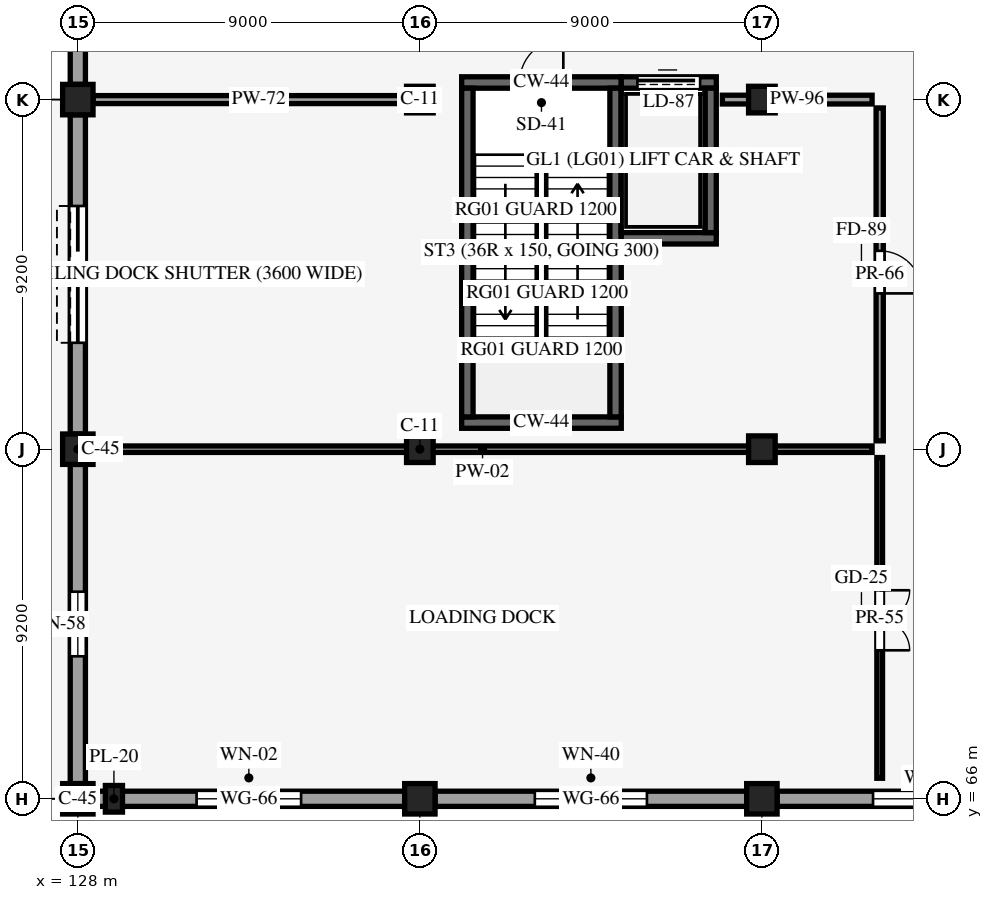
"""IFC4 building model, lengths in metres.
Left out: names, types, materials, properties, quantities, classifications, styles, units other than length and angle.
Written with IfcOpenShell. Run it as: python <this file> out.ifc"""

import sys

from ifc_helpers import new_model, si_unit, direction, frame, frame_2d, origin, origin_2d, place, context, subcontext, project, spatial, rectangle, extrude, element, fill, save


model = new_model("IFC4")
c1 = context("Model", 3, precision=1e-05, world=origin(), true_north=direction((0.0, 1.0)))
c2 = subcontext(c1, "Body", "Model", "MODEL_VIEW")
j1 = project(units=[si_unit("LENGTHUNIT", "METRE"), si_unit("PLANEANGLEUNIT", "RADIAN")], contexts=[c1])
p1 = place(None, origin())
s1 = spatial("IfcSite", under=j1, at=p1, CompositionType="ELEMENT")
p2 = place(p1, origin())
s2 = spatial("IfcBuilding", under=s1, at=p2, CompositionType="ELEMENT")
p3 = place(p2, origin())
s3 = spatial("IfcBuildingStorey", under=s2, at=p3, CompositionType="ELEMENT", Elevation=0.0)
for number, where, z_axis, x_axis in (
    (1, (128.0, 66.0, 0.0), (0.0, 0.0, 1.0), (1.0, 0.0, 0.0)),
    (2, (128.0, 75.2, 0.0), (0.0, 0.0, 1.0), (1.0, 0.0, 0.0)),
    (3, (128.0, 84.4, 0.0), (0.0, 0.0, 1.0), (1.0, 0.0, 0.0)),
    (4, (137.0, 66.0, 0.0), (0.0, 0.0, 1.0), (1.0, 0.0, 0.0)),
):
    element("IfcColumn", number, at=place(p3, frame(where, z_axis=z_axis, x_axis=x_axis)), inside=s3, PredefinedType="COLUMN", context=c2, shape_type="SweptSolid", body=[
        extrude(rectangle(XDim=0.8, YDim=0.8, at=origin_2d()), origin(), (0.0, 0.0, 1.0), 5.4),
    ])
for number, where, z_axis, x_axis in (
    (5, (137.0, 75.2, 0.0), (0.0, 0.0, 1.0), (1.0, 0.0, 0.0)),
    (6, (137.0, 84.4, 0.0), (0.0, 0.0, 1.0), (1.0, 0.0, 0.0)),
):
    element("IfcColumn", number, at=place(p3, frame(where, z_axis=z_axis, x_axis=x_axis)), inside=s3, PredefinedType="COLUMN", context=c2, shape_type="SweptSolid", body=[
        extrude(rectangle(XDim=0.7, YDim=0.7, at=origin_2d()), origin(), (0.0, 0.0, 1.0), 5.4),
    ])
p4 = place(p3, frame((146.0, 66.0, 0.0), z_axis=(0.0, 0.0, 1.0), x_axis=(1.0, 0.0, 0.0)))
e7 = element("IfcColumn", 7, at=p4, inside=s3, PredefinedType="COLUMN", context=c2, shape_type="SweptSolid", body=[
    extrude(rectangle(XDim=0.8, YDim=0.8, at=origin_2d()), origin(), (0.0, 0.0, 1.0), 5.4),
])
for number, where, z_axis, x_axis in (
    (8, (146.0, 75.2, 0.0), (0.0, 0.0, 1.0), (1.0, 0.0, 0.0)),
    (9, (146.0, 84.4, 0.0), (0.0, 0.0, 1.0), (1.0, 0.0, 0.0)),
):
    element("IfcColumn", number, at=place(p3, frame(where, z_axis=z_axis, x_axis=x_axis)), inside=s3, PredefinedType="COLUMN", context=c2, shape_type="SweptSolid", body=[
        extrude(rectangle(XDim=0.7, YDim=0.7, at=origin_2d()), origin(), (0.0, 0.0, 1.0), 5.4),
    ])
p5 = place(p3, frame((128.95, 66.0, 0.0), z_axis=(0.0, 0.0, 1.0), x_axis=(1.0, 0.0, 0.0)))
e10 = element("IfcColumn", 10, at=p5, inside=s3, PredefinedType="PILASTER", context=c2, shape_type="SweptSolid", body=[
    extrude(rectangle(XDim=0.45, YDim=0.7, at=origin_2d()), origin(), (0.0, 0.0, 1.0), 4.35),
])
p6 = place(p3, frame((128.4, 66.0, 0.0), z_axis=(0.0, 0.0, 1.0), x_axis=(1.0, 0.0, 0.0)))
e11 = element("IfcWall", 11, at=p6, inside=s3, PredefinedType="STANDARD", context=c2, shape_type="SweptSolid", body=[
    extrude(rectangle(XDim=8.2, YDim=0.4, at=frame_2d((4.1, 0.0))), origin(), (0.0, 0.0, 1.0), 4.095),
])
p7 = place(p6, frame((5.475, 0.0, 0.85), z_axis=(0.0, 0.0, 1.0), x_axis=(-1.0, 0.0, 0.0)))
e12 = element("IfcOpeningElement", 12, at=p7, cuts=e11, PredefinedType="OPENING", context=c2, shape_type="SweptSolid", body=[
    extrude(rectangle(XDim=2.75, YDim=2.45, at=frame_2d((1.375, 1.225))), frame((0.0, 0.21, 0.0), z_axis=(0.0, -1.0, 0.0), x_axis=(1.0, 0.0, 0.0)), (0.0, 0.0, 1.0), 0.42),
])
p8 = place(p3, frame((137.4, 66.0, 0.0), z_axis=(0.0, 0.0, 1.0), x_axis=(1.0, 0.0, 0.0)))
e13 = element("IfcWall", 13, at=p8, inside=s3, PredefinedType="STANDARD", context=c2, shape_type="SweptSolid", body=[
    extrude(rectangle(XDim=8.2, YDim=0.4, at=frame_2d((4.1, 0.0))), origin(), (0.0, 0.0, 1.0), 4.095),
])
p9 = place(p8, frame((5.575, 0.0, 0.85), z_axis=(0.0, 0.0, 1.0), x_axis=(-1.0, 0.0, 0.0)))
e14 = element("IfcOpeningElement", 14, at=p9, cuts=e13, PredefinedType="OPENING", context=c2, shape_type="SweptSolid", body=[
    extrude(rectangle(XDim=2.95, YDim=2.5, at=frame_2d((1.475, 1.25))), frame((0.0, 0.21, 0.0), z_axis=(0.0, -1.0, 0.0), x_axis=(1.0, 0.0, 0.0)), (0.0, 0.0, 1.0), 0.42),
])
p10 = place(p3, frame((146.4, 66.0, 0.0), z_axis=(0.0, 0.0, 1.0), x_axis=(1.0, 0.0, 0.0)))
e15 = element("IfcWall", 15, at=p10, inside=s3, PredefinedType="STANDARD", context=c2, shape_type="SweptSolid", body=[
    extrude(rectangle(XDim=8.2, YDim=0.4, at=frame_2d((4.1, 0.0))), origin(), (0.0, 0.0, 1.0), 4.095),
])
p11 = place(p10, frame((5.675, 0.0, 0.85), z_axis=(0.0, 0.0, 1.0), x_axis=(-1.0, 0.0, 0.0)))
e16 = element("IfcOpeningElement", 16, at=p11, cuts=e15, PredefinedType="OPENING", context=c2, shape_type="SweptSolid", body=[
    extrude(rectangle(XDim=3.15, YDim=2.55, at=frame_2d((1.575, 1.275))), frame((0.0, 0.21, 0.0), z_axis=(0.0, -1.0, 0.0), x_axis=(1.0, 0.0, 0.0)), (0.0, 0.0, 1.0), 0.42),
])
p12 = place(p3, frame((128.0, 66.4, 0.0), z_axis=(0.0, 0.0, 1.0), x_axis=(0.0, 1.0, 0.0)))
e17 = element("IfcWall", 17, at=p12, inside=s3, PredefinedType="STANDARD", context=c2, shape_type="SweptSolid", body=[
    extrude(rectangle(XDim=8.4, YDim=0.4, at=frame_2d((4.2, 0.0))), origin(), (0.0, 0.0, 1.0), 4.095),
])
p13 = place(p12, frame((3.35, 0.0, 0.85)))
e18 = element("IfcOpeningElement", 18, at=p13, cuts=e17, PredefinedType="OPENING", context=c2, shape_type="SweptSolid", body=[
    extrude(rectangle(XDim=1.7, YDim=2.3, at=frame_2d((0.85, 1.15))), frame((0.0, 0.21, 0.0), z_axis=(0.0, -1.0, 0.0), x_axis=(1.0, 0.0, 0.0)), (0.0, 0.0, 1.0), 0.42),
])
p14 = place(p3, frame((128.0, 75.6, 0.0), z_axis=(0.0, 0.0, 1.0), x_axis=(0.0, 1.0, 0.0)))
e19 = element("IfcWall", 19, at=p14, inside=s3, PredefinedType="STANDARD", context=c2, shape_type="SweptSolid", body=[
    extrude(rectangle(XDim=8.4, YDim=0.4, at=frame_2d((4.2, 0.0))), origin(), (0.0, 0.0, 1.0), 4.095),
])
p15 = place(p14, frame((2.4, 0.0, 0.0)))
e20 = element("IfcOpeningElement", 20, at=p15, cuts=e19, PredefinedType="OPENING", context=c2, shape_type="SweptSolid", body=[
    extrude(rectangle(XDim=3.6, YDim=3.91, at=frame_2d((1.8, 1.955))), frame((0.0, 0.21, 0.0), z_axis=(0.0, -1.0, 0.0), x_axis=(1.0, 0.0, 0.0)), (0.0, 0.0, 1.0), 0.42),
])
p16 = place(p3, frame((128.0, 84.8, 0.0), z_axis=(0.0, 0.0, 1.0), x_axis=(0.0, 1.0, 0.0)))
e21 = element("IfcWall", 21, at=p16, inside=s3, PredefinedType="STANDARD", context=c2, shape_type="SweptSolid", body=[
    extrude(rectangle(XDim=8.4, YDim=0.4, at=frame_2d((4.2, 0.0))), origin(), (0.0, 0.0, 1.0), 4.095),
])
p17 = place(p16, frame((3.05, 0.0, 0.85)))
e22 = element("IfcOpeningElement", 22, at=p17, cuts=e21, PredefinedType="OPENING", context=c2, shape_type="SweptSolid", body=[
    extrude(rectangle(XDim=2.3, YDim=2.5, at=frame_2d((1.15, 1.25))), frame((0.0, 0.21, 0.0), z_axis=(0.0, -1.0, 0.0), x_axis=(1.0, 0.0, 0.0)), (0.0, 0.0, 1.0), 0.42),
])
p18 = place(p3, frame((138.1, 84.85, 0.0), z_axis=(0.0, 0.0, 1.0), x_axis=(1.0, 0.0, 0.0)))
e23 = element("IfcWall", 23, at=p18, inside=s3, PredefinedType="SHEAR", context=c2, shape_type="SweptSolid", body=[
    extrude(rectangle(XDim=4.2, YDim=0.3, at=frame_2d((2.1, 0.0))), origin(), (0.0, 0.0, 1.0), 5.12),
])
p19 = place(p18, frame((1.525, 0.0, 0.0)))
e24 = element("IfcOpeningElement", 24, at=p19, cuts=e23, PredefinedType="OPENING", context=c2, shape_type="SweptSolid", body=[
    extrude(rectangle(XDim=1.15, YDim=2.2, at=frame_2d((0.575, 1.1))), frame((0.0, 0.16, 0.0), z_axis=(0.0, -1.0, 0.0), x_axis=(1.0, 0.0, 0.0)), (0.0, 0.0, 1.0), 0.32),
])
p20 = place(p3, frame((138.1, 75.9, 0.0), z_axis=(0.0, 0.0, 1.0), x_axis=(1.0, 0.0, 0.0)))
e25 = element("IfcWall", 25, at=p20, inside=s3, PredefinedType="SHEAR", context=c2, shape_type="SweptSolid", body=[
    extrude(rectangle(XDim=4.2, YDim=0.3, at=frame_2d((2.1, 0.0))), origin(), (0.0, 0.0, 1.0), 5.12),
])
for number, where, z_axis, x_axis in (
    (26, (138.25, 76.05, 0.0), (0.0, 0.0, 1.0), (0.0, 1.0, 0.0)),
    (27, (142.15, 76.05, 0.0), (0.0, 0.0, 1.0), (0.0, 1.0, 0.0)),
):
    element("IfcWall", number, at=place(p3, frame(where, z_axis=z_axis, x_axis=x_axis)), inside=s3, PredefinedType="SHEAR", context=c2, shape_type="SweptSolid", body=[
        extrude(rectangle(XDim=8.65, YDim=0.3, at=frame_2d((4.325, 0.0))), origin(), (0.0, 0.0, 1.0), 5.12),
    ])
p21 = place(p3, frame((142.3, 84.85, 0.0), z_axis=(0.0, 0.0, 1.0), x_axis=(1.0, 0.0, 0.0)))
e28 = element("IfcWall", 28, at=p21, inside=s3, PredefinedType="SHEAR", context=c2, shape_type="SweptSolid", body=[
    extrude(rectangle(XDim=2.5, YDim=0.3, at=frame_2d((1.25, 0.0))), origin(), (0.0, 0.0, 1.0), 5.12),
])
p22 = place(p21, frame((0.425, 0.0, 0.0)))
e29 = element("IfcOpeningElement", 29, at=p22, cuts=e28, PredefinedType="OPENING", context=c2, shape_type="SweptSolid", body=[
    extrude(rectangle(XDim=1.65, YDim=2.45, at=frame_2d((0.825, 1.225))), frame((0.0, 0.16, 0.0), z_axis=(0.0, -1.0, 0.0), x_axis=(1.0, 0.0, 0.0)), (0.0, 0.0, 1.0), 0.32),
])
p23 = place(p3, frame((142.3, 80.75, 0.0), z_axis=(0.0, 0.0, 1.0), x_axis=(1.0, 0.0, 0.0)))
e30 = element("IfcWall", 30, at=p23, inside=s3, PredefinedType="SHEAR", context=c2, shape_type="SweptSolid", body=[
    extrude(rectangle(XDim=2.5, YDim=0.3, at=frame_2d((1.25, 0.0))), origin(), (0.0, 0.0, 1.0), 5.12),
])
p24 = place(p3, frame((144.65, 80.9, 0.0), z_axis=(0.0, 0.0, 1.0), x_axis=(0.0, 1.0, 0.0)))
e31 = element("IfcWall", 31, at=p24, inside=s3, PredefinedType="SHEAR", context=c2, shape_type="SweptSolid", body=[
    extrude(rectangle(XDim=3.8, YDim=0.3, at=frame_2d((1.9, 0.0))), origin(), (0.0, 0.0, 1.0), 5.12),
])
p25 = place(p3, frame((149.1, 66.54, 0.0), z_axis=(0.0, 0.0, 1.0), x_axis=(0.0, 1.0, 0.0)))
e32 = element("IfcWall", 32, at=p25, inside=s3, PredefinedType="PARTITIONING", context=c2, shape_type="SweptSolid", body=[
    extrude(rectangle(XDim=8.44, YDim=0.15, at=frame_2d((4.22, 0.0))), origin(), (0.0, 0.0, 1.0), 4.095),
])
p26 = place(p25, frame((4.948, 0.0, 0.0), z_axis=(0.0, 0.0, 1.0), x_axis=(-1.0, 0.0, 0.0)))
e33 = element("IfcOpeningElement", 33, at=p26, cuts=e32, PredefinedType="OPENING", context=c2, shape_type="SweptSolid", body=[
    extrude(rectangle(XDim=1.58, YDim=2.38, at=frame_2d((0.79, 1.19))), frame((0.0, 0.085, 0.0), z_axis=(0.0, -1.0, 0.0), x_axis=(1.0, 0.0, 0.0)), (0.0, 0.0, 1.0), 0.17),
])
p27 = place(p3, frame((128.4, 75.2, 0.0), z_axis=(0.0, 0.0, 1.0), x_axis=(1.0, 0.0, 0.0)))
e34 = element("IfcWall", 34, at=p27, inside=s3, PredefinedType="PARTITIONING", context=c2, shape_type="SweptSolid", body=[
    extrude(rectangle(XDim=20.5, YDim=0.17, at=frame_2d((10.25, 0.0))), origin(), (0.0, 0.0, 1.0), 4.095),
])
p28 = place(p3, frame((149.1, 75.42, 0.0), z_axis=(0.0, 0.0, 1.0), x_axis=(0.0, 1.0, 0.0)))
e35 = element("IfcWall", 35, at=p28, inside=s3, PredefinedType="PARTITIONING", context=c2, shape_type="SweptSolid", body=[
    extrude(rectangle(XDim=8.76, YDim=0.19, at=frame_2d((4.38, 0.0))), origin(), (0.0, 0.0, 1.0), 4.095),
])
p29 = place(p28, frame((5.0, 0.0, 0.0), z_axis=(0.0, 0.0, 1.0), x_axis=(-1.0, 0.0, 0.0)))
e36 = element("IfcOpeningElement", 36, at=p29, cuts=e35, PredefinedType="OPENING", context=c2, shape_type="SweptSolid", body=[
    extrude(rectangle(XDim=1.12, YDim=2.26, at=frame_2d((0.56, 1.13))), frame((0.0, 0.105, 0.0), z_axis=(0.0, -1.0, 0.0), x_axis=(1.0, 0.0, 0.0)), (0.0, 0.0, 1.0), 0.21),
])
p30 = place(p3, frame((128.4, 84.4, 0.0), z_axis=(0.0, 0.0, 1.0), x_axis=(1.0, 0.0, 0.0)))
e37 = element("IfcWall", 37, at=p30, inside=s3, PredefinedType="PARTITIONING", context=c2, shape_type="SweptSolid", body=[
    extrude(rectangle(XDim=8.72, YDim=0.21, at=frame_2d((4.36, 0.0))), origin(), (0.0, 0.0, 1.0), 4.095),
])
p31 = place(p3, frame((144.96, 84.4, 0.0), z_axis=(0.0, 0.0, 1.0), x_axis=(1.0, 0.0, 0.0)))
e38 = element("IfcWall", 38, at=p31, inside=s3, PredefinedType="PARTITIONING", context=c2, shape_type="SweptSolid", body=[
    extrude(rectangle(XDim=3.94, YDim=0.23, at=frame_2d((1.97, 0.0))), origin(), (0.0, 0.0, 1.0), 4.095),
])
p32 = place(p7, origin())
e39 = element("IfcWindow", 39, at=p32, inside=s3, PartitioningType="SINGLE_PANEL", PredefinedType="WINDOW", context=c2, shape_type="SweptSolid", body=[
    extrude(rectangle(XDim=2.75, YDim=2.45, at=frame_2d((1.375, 1.225))), frame((0.0, 0.03, 0.0), z_axis=(0.0, -1.0, 0.0), x_axis=(1.0, 0.0, 0.0)), (0.0, 0.0, 1.0), 0.06),
])
fill(e12, e39)
p33 = place(p9, origin())
e40 = element("IfcWindow", 40, at=p33, inside=s3, PartitioningType="SINGLE_PANEL", PredefinedType="WINDOW", context=c2, shape_type="SweptSolid", body=[
    extrude(rectangle(XDim=2.95, YDim=2.5, at=frame_2d((1.475, 1.25))), frame((0.0, 0.03, 0.0), z_axis=(0.0, -1.0, 0.0), x_axis=(1.0, 0.0, 0.0)), (0.0, 0.0, 1.0), 0.06),
])
fill(e14, e40)
p34 = place(p11, origin())
e41 = element("IfcWindow", 41, at=p34, inside=s3, PartitioningType="SINGLE_PANEL", PredefinedType="WINDOW", context=c2, shape_type="SweptSolid", body=[
    extrude(rectangle(XDim=3.15, YDim=2.55, at=frame_2d((1.575, 1.275))), frame((0.0, 0.03, 0.0), z_axis=(0.0, -1.0, 0.0), x_axis=(1.0, 0.0, 0.0)), (0.0, 0.0, 1.0), 0.06),
])
fill(e16, e41)
p35 = place(p13, origin())
e42 = element("IfcWindow", 42, at=p35, inside=s3, PartitioningType="SINGLE_PANEL", PredefinedType="WINDOW", context=c2, shape_type="SweptSolid", body=[
    extrude(rectangle(XDim=1.7, YDim=2.3, at=frame_2d((0.85, 1.15))), frame((0.0, 0.03, 0.0), z_axis=(0.0, -1.0, 0.0), x_axis=(1.0, 0.0, 0.0)), (0.0, 0.0, 1.0), 0.06),
])
fill(e18, e42)
p36 = place(p15, origin())
e43 = element("IfcDoor", 43, at=p36, inside=s3, OperationType="ROLLINGUP", PredefinedType="GATE", context=c2, shape_type="SweptSolid", body=[
    extrude(rectangle(XDim=3.6, YDim=3.91, at=frame_2d((1.8, 1.955))), frame((0.0, 0.025, 0.0), z_axis=(0.0, -1.0, 0.0), x_axis=(1.0, 0.0, 0.0)), (0.0, 0.0, 1.0), 0.05),
])
fill(e20, e43)
p37 = place(p19, origin())
e44 = element("IfcDoor", 44, at=p37, inside=s3, OperationType="SINGLE_SWING_RIGHT", PredefinedType="DOOR", context=c2, shape_type="SweptSolid", body=[
    extrude(rectangle(XDim=1.15, YDim=2.2, at=frame_2d((0.575, 1.1))), frame((0.0, 0.025, 0.0), z_axis=(0.0, -1.0, 0.0), x_axis=(1.0, 0.0, 0.0)), (0.0, 0.0, 1.0), 0.05),
])
fill(e24, e44)
p38 = place(p22, origin())
e45 = element("IfcDoor", 45, at=p38, inside=s3, OperationType="SLIDING_TO_LEFT", PredefinedType="DOOR", context=c2, shape_type="SweptSolid", body=[
    extrude(rectangle(XDim=1.65, YDim=2.45, at=frame_2d((0.825, 1.225))), frame((0.0, 0.025, 0.0), z_axis=(0.0, -1.0, 0.0), x_axis=(1.0, 0.0, 0.0)), (0.0, 0.0, 1.0), 0.05),
])
fill(e29, e45)
p39 = place(p26, origin())
e46 = element("IfcDoor", 46, at=p39, inside=s3, OperationType="DOUBLE_DOOR_SINGLE_SWING", PredefinedType="DOOR", context=c2, shape_type="SweptSolid", body=[
    extrude(rectangle(XDim=1.58, YDim=2.38, at=frame_2d((0.79, 1.19))), frame((0.0, 0.025, 0.0), z_axis=(0.0, -1.0, 0.0), x_axis=(1.0, 0.0, 0.0)), (0.0, 0.0, 1.0), 0.05),
])
fill(e33, e46)
p40 = place(p29, origin())
e47 = element("IfcDoor", 47, at=p40, inside=s3, OperationType="SINGLE_SWING_RIGHT", PredefinedType="DOOR", context=c2, shape_type="SweptSolid", body=[
    extrude(rectangle(XDim=1.12, YDim=2.26, at=frame_2d((0.56, 1.13))), frame((0.0, 0.025, 0.0), z_axis=(0.0, -1.0, 0.0), x_axis=(1.0, 0.0, 0.0)), (0.0, 0.0, 1.0), 0.05),
])
fill(e36, e47)
save(model, sys.argv[1])
